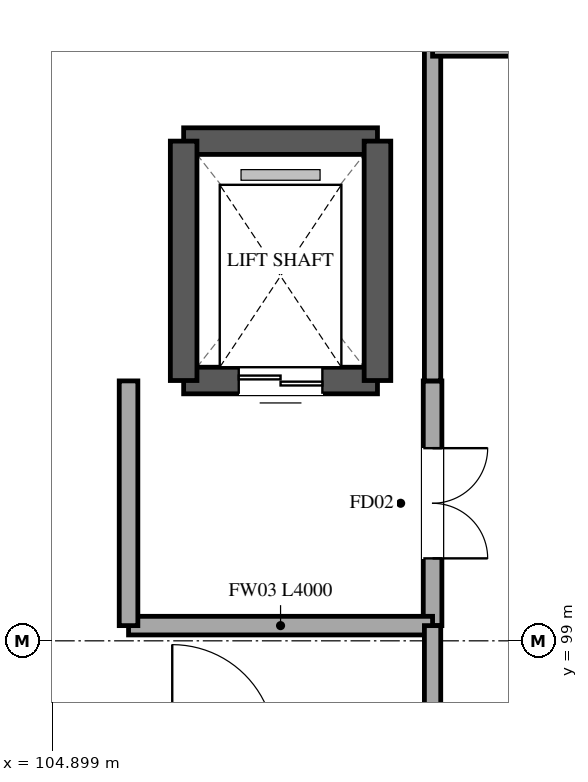
"""IFC4 building model, lengths in metres.
Left out: names, types, materials, properties, quantities, classifications, styles, units other than length and angle.
Written with IfcOpenShell. Run it as: python <this file> out.ifc"""

import sys

from ifc_helpers import new_model, si_unit, direction, frame, frame_2d, origin, place, context, subcontext, project, spatial, rectangle, extrude, element, fill, save


model = new_model("IFC4")
c1 = context("Model", 3, precision=1e-05, world=origin(), true_north=direction((0.0, 1.0)))
c2 = subcontext(c1, "Body", "Model", "MODEL_VIEW")
j1 = project(units=[si_unit("LENGTHUNIT", "METRE"), si_unit("PLANEANGLEUNIT", "RADIAN")], contexts=[c1])
p1 = place(None, origin())
s1 = spatial("IfcSite", under=j1, at=p1, CompositionType="ELEMENT")
p2 = place(p1, origin())
s2 = spatial("IfcBuilding", under=s1, at=p2, CompositionType="ELEMENT")
p3 = place(p2, frame((0.0, 0.0, 11.4)))
s3 = spatial("IfcBuildingStorey", under=s2, at=p3, CompositionType="ELEMENT", Elevation=11.4)
p4 = place(p3, frame((106.625, 105.575, 0.0), z_axis=(0.0, 0.0, 1.0), x_axis=(1.0, 0.0, 0.0)))
e1 = element("IfcWall", 1, at=p4, inside=s3, PredefinedType="SHEAR", context=c2, shape_type="SweptSolid", body=[
    extrude(rectangle(XDim=2.55, YDim=0.35, at=frame_2d((1.275, 0.0))), origin(), (0.0, 0.0, 1.0), 5.1),
])
p5 = place(p3, frame((109.175, 102.425, 0.0), z_axis=(0.0, 0.0, 1.0), x_axis=(-1.0, 0.0, 0.0)))
e2 = element("IfcWall", 2, at=p5, inside=s3, PredefinedType="SHEAR", context=c2, shape_type="SweptSolid", body=[
    extrude(rectangle(XDim=2.55, YDim=0.35, at=frame_2d((1.275, 0.0))), origin(), (0.0, 0.0, 1.0), 5.1),
])
p6 = place(p5, frame((0.725, 0.0, 0.0)))
e3 = element("IfcOpeningElement", 3, at=p6, cuts=e2, PredefinedType="OPENING", context=c2, shape_type="SweptSolid", body=[
    extrude(rectangle(XDim=1.1, YDim=2.2, at=frame_2d((0.55, 1.1))), frame((0.0, 0.185, 0.0), z_axis=(0.0, -1.0, 0.0), x_axis=(1.0, 0.0, 0.0)), (0.0, 0.0, 1.0), 0.37),
])
for number, where, z_axis, x_axis in (
    (4, (106.625, 102.425, 0.0), (0.0, 0.0, 1.0), (0.0, 1.0, 0.0)),
    (5, (109.175, 105.575, 0.0), (0.0, 0.0, 1.0), (0.0, -1.0, 0.0)),
):
    element("IfcWall", number, at=place(p3, frame(where, z_axis=z_axis, x_axis=x_axis)), inside=s3, PredefinedType="SHEAR", context=c2, shape_type="SweptSolid", body=[
        extrude(rectangle(XDim=3.15, YDim=0.35, at=frame_2d((1.575, 0.0))), origin(), (0.0, 0.0, 1.0), 5.1),
    ])
p7 = place(p3, frame((109.9, 102.42, 0.0), z_axis=(0.0, 0.0, 1.0), x_axis=(0.0, -1.0, 0.0)))
e6 = element("IfcWall", 6, at=p7, inside=s3, PredefinedType="STANDARD", context=c2, shape_type="SweptSolid", body=[
    extrude(rectangle(XDim=3.22, YDim=0.245, at=frame_2d((1.61, 0.0))), origin(), (0.0, 0.0, 1.0), 4.075),
])
p8 = place(p7, frame((0.885, 0.0, 0.0)))
e7 = element("IfcOpeningElement", 7, at=p8, cuts=e6, PredefinedType="OPENING", context=c2, shape_type="SweptSolid", body=[
    extrude(rectangle(XDim=1.45, YDim=2.2, at=frame_2d((0.725, 1.1))), frame((0.0, 0.133, 0.0), z_axis=(0.0, -1.0, 0.0), x_axis=(1.0, 0.0, 0.0)), (0.0, 0.0, 1.0), 0.265),
])
p9 = place(p3, frame((109.9, 99.2, 0.0), z_axis=(0.0, 0.0, 1.0), x_axis=(-1.0, 0.0, 0.0)))
e8 = element("IfcWall", 8, at=p9, inside=s3, PredefinedType="STANDARD", context=c2, shape_type="SweptSolid", body=[
    extrude(rectangle(XDim=4.0, YDim=0.245, at=frame_2d((2.0, 0.0))), origin(), (0.0, 0.0, 1.0), 4.075),
])
p10 = place(p3, frame((105.9, 99.2, 0.0), z_axis=(0.0, 0.0, 1.0), x_axis=(0.0, 1.0, 0.0)))
e9 = element("IfcWall", 9, at=p10, inside=s3, PredefinedType="STANDARD", context=c2, shape_type="SweptSolid", body=[
    extrude(rectangle(XDim=3.22, YDim=0.245, at=frame_2d((1.61, 0.0))), origin(), (0.0, 0.0, 1.0), 4.075),
])
p11 = place(p3, frame((109.9, 97.6, 0.0), z_axis=(0.0, 0.0, 1.0), x_axis=(0.0, 1.0, 0.0)))
e10 = element("IfcWall", 10, at=p11, inside=s3, PredefinedType="PARTITIONING", context=c2, shape_type="SweptSolid", body=[
    extrude(rectangle(XDim=1.6, YDim=0.215, at=frame_2d((0.8, 0.0))), origin(), (0.0, 0.0, 1.0), 4.075),
])
p12 = place(p3, frame((109.9, 102.42, 0.0), z_axis=(0.0, 0.0, 1.0), x_axis=(0.0, 1.0, 0.0)))
e11 = element("IfcWall", 11, at=p12, inside=s3, PredefinedType="PARTITIONING", context=c2, shape_type="SweptSolid", body=[
    extrude(rectangle(XDim=4.38, YDim=0.215, at=frame_2d((2.19, 0.0))), origin(), (0.0, 0.0, 1.0), 4.075),
])
p13 = place(p3, frame((109.9, 106.8, 0.0), z_axis=(0.0, 0.0, 1.0), x_axis=(1.0, 0.0, 0.0)))
e12 = element("IfcWall", 12, at=p13, inside=s3, PredefinedType="PARTITIONING", context=c2, shape_type="SweptSolid", body=[
    extrude(rectangle(XDim=2.74, YDim=0.215, at=frame_2d((1.37, 0.0))), origin(), (0.0, 0.0, 1.0), 4.075),
])
p14 = place(p6, origin())
e13 = element("IfcDoor", 13, at=p14, inside=s3, OperationType="DOUBLE_DOOR_SLIDING", PredefinedType="DOOR", context=c2, shape_type="SweptSolid", body=[
    extrude(rectangle(XDim=1.1, YDim=2.2, at=frame_2d((0.55, 1.1))), frame((0.0, 0.025, 0.0), z_axis=(0.0, -1.0, 0.0), x_axis=(1.0, 0.0, 0.0)), (0.0, 0.0, 1.0), 0.05),
])
fill(e3, e13)
p15 = place(p8, origin())
e14 = element("IfcDoor", 14, at=p15, inside=s3, OperationType="DOUBLE_DOOR_SINGLE_SWING", PredefinedType="DOOR", context=c2, shape_type="SweptSolid", body=[
    extrude(rectangle(XDim=1.45, YDim=2.2, at=frame_2d((0.725, 1.1))), frame((0.0, 0.025, 0.0), z_axis=(0.0, -1.0, 0.0), x_axis=(1.0, 0.0, 0.0)), (0.0, 0.0, 1.0), 0.05),
])
fill(e7, e14)
save(model, sys.argv[1])
